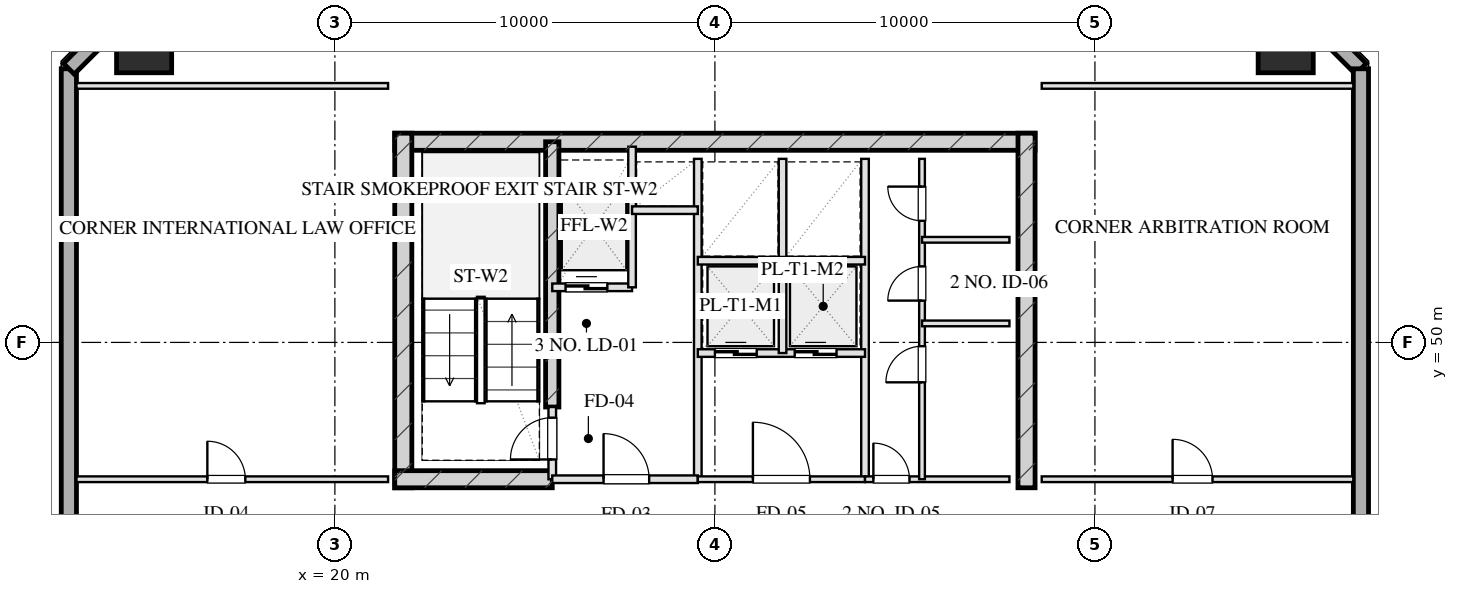
"""IFC4 building model, lengths in metres.
Left out: names, types, materials, properties, quantities, classifications, styles, units other than length and angle.
Written with IfcOpenShell. Run it as: python <this file> out.ifc"""

import sys

from ifc_helpers import new_model, si_unit, direction, frame, frame_2d, origin, origin_2d, place, context, subcontext, project, spatial, rectangle, hollow_rectangle, extrude, element, fill, save


model = new_model("IFC4")
c1 = context("Model", 3, precision=1e-05, world=origin(), true_north=direction((0.0, 1.0)))
c2 = subcontext(c1, "Body", "Model", "MODEL_VIEW")
j1 = project(units=[si_unit("LENGTHUNIT", "METRE"), si_unit("PLANEANGLEUNIT", "RADIAN")], contexts=[c1])
p1 = place(None, origin())
s1 = spatial("IfcSite", under=j1, at=p1, CompositionType="ELEMENT")
p2 = place(p1, origin())
s2 = spatial("IfcBuilding", under=s1, at=p2, CompositionType="ELEMENT")
p3 = place(p2, frame((0.0, 0.0, 188.6)))
s3 = spatial("IfcBuildingStorey", under=s2, at=p3, CompositionType="ELEMENT", Elevation=188.6)
p4 = place(p3, frame((21.575, 55.28, 0.0), z_axis=(0.0, 0.0, 1.0), x_axis=(1.0, 0.0, 0.0)))
e1 = element("IfcWall", 1, at=p4, inside=s3, PredefinedType="SHEAR", context=c2, shape_type="SweptSolid", body=[
    extrude(rectangle(XDim=16.85, YDim=0.45, at=frame_2d((8.425, 0.0))), origin(), (0.0, 0.0, 1.0), 3.45),
])
for number, where, z_axis, x_axis in (
    (2, (21.8, 46.175, 0.0), (0.0, 0.0, 1.0), (0.0, 1.0, 0.0)),
    (3, (38.2, 46.175, 0.0), (0.0, 0.0, 1.0), (0.0, 1.0, 0.0)),
):
    element("IfcWall", number, at=place(p3, frame(where, z_axis=z_axis, x_axis=x_axis)), inside=s3, PredefinedType="SHEAR", context=c2, shape_type="SweptSolid", body=[
        extrude(rectangle(XDim=9.33, YDim=0.45, at=frame_2d((4.665, 0.0))), origin(), (0.0, 0.0, 1.0), 3.45),
    ])
p5 = place(p3, frame((25.72, 48.3, 0.0), z_axis=(0.0, 0.0, 1.0), x_axis=(0.0, 1.0, 0.0)))
e4 = element("IfcWall", 4, at=p5, inside=s3, PredefinedType="SHEAR", context=c2, shape_type="SweptSolid", body=[
    extrude(rectangle(XDim=6.98, YDim=0.35, at=frame_2d((3.49, 0.0))), origin(), (0.0, 0.0, 1.0), 3.45),
])
p6 = place(p3, frame((21.575, 46.4, 0.0), z_axis=(0.0, 0.0, 1.0), x_axis=(1.0, 0.0, 0.0)))
e5 = element("IfcWall", 5, at=p6, inside=s3, PredefinedType="SHEAR", context=c2, shape_type="SweptSolid", body=[
    extrude(rectangle(XDim=4.145, YDim=0.45, at=frame_2d((2.073, 0.0))), origin(), (0.0, 0.0, 1.0), 3.45),
])
for number, where, z_axis, x_axis in (
    (6, (45.02, 57.82, 0.0), (0.0, 0.0, 1.0), (1.0, 0.0, 0.0)),
    (7, (14.98, 57.82, 0.0), (0.0, 0.0, 1.0), (1.0, 0.0, 0.0)),
):
    element("IfcColumn", number, at=place(p3, frame(where, z_axis=z_axis, x_axis=x_axis)), inside=s3, PredefinedType="COLUMN", context=c2, shape_type="SweptSolid", body=[
        extrude(hollow_rectangle(XDim=1.45, YDim=1.45, WallThickness=0.05, at=origin_2d()), origin(), (0.0, 0.0, 1.0), 3.451),
    ])
p7 = place(p3, frame((13.0, 10.8, 0.0), z_axis=(0.0, 0.0, 1.0), x_axis=(0.0, 1.0, 0.0)))
e8 = element("IfcWall", 8, at=p7, inside=s3, PredefinedType="SOLIDWALL", context=c2, shape_type="SweptSolid", body=[
    extrude(rectangle(XDim=46.4, YDim=0.4, at=frame_2d((23.2, 0.0))), origin(), (0.0, 0.0, 1.0), 2.61),
])
p8 = place(p7, frame((24.75, 0.0, 0.75)))
e9 = element("IfcOpeningElement", 9, at=p8, cuts=e8, PredefinedType="OPENING", context=c2, shape_type="SweptSolid", body=[
    extrude(rectangle(XDim=2.1, YDim=1.46, at=frame_2d((1.05, 0.73))), frame((0.0, 0.21, 0.0), z_axis=(0.0, -1.0, 0.0), x_axis=(1.0, 0.0, 0.0)), (0.0, 0.0, 1.0), 0.42),
])
p9 = place(p7, frame((28.55, 0.0, 0.75)))
e10 = element("IfcOpeningElement", 10, at=p9, cuts=e8, PredefinedType="OPENING", context=c2, shape_type="SweptSolid", body=[
    extrude(rectangle(XDim=2.1, YDim=1.46, at=frame_2d((1.05, 0.73))), frame((0.0, 0.21, 0.0), z_axis=(0.0, -1.0, 0.0), x_axis=(1.0, 0.0, 0.0)), (0.0, 0.0, 1.0), 0.42),
])
p10 = place(p7, frame((19.55, 0.0, 0.0)))
e11 = element("IfcOpeningElement", 11, at=p10, cuts=e8, PredefinedType="OPENING", context=c2, shape_type="SweptSolid", body=[
    extrude(rectangle(XDim=1.1, YDim=2.15, at=frame_2d((0.55, 1.075))), frame((0.0, 0.21, 0.0), z_axis=(0.0, -1.0, 0.0), x_axis=(1.0, 0.0, 0.0)), (0.0, 0.0, 1.0), 0.42),
])
for number, where, z_axis, x_axis in (
    (12, (13.0, 57.2, 0.0), (0.0, 0.0, 1.0), (0.707, 0.707, 0.0)),
    (13, (44.4, 59.8, 0.0), (0.0, 0.0, 1.0), (0.707, -0.707, 0.0)),
):
    element("IfcWall", number, at=place(p3, frame(where, z_axis=z_axis, x_axis=x_axis)), inside=s3, PredefinedType="SOLIDWALL", context=c2, shape_type="SweptSolid", body=[
        extrude(rectangle(XDim=3.677, YDim=0.4, at=frame_2d((1.838, 0.0))), origin(), (0.0, 0.0, 1.0), 2.61),
    ])
p11 = place(p3, frame((47.0, 57.2, 0.0), z_axis=(0.0, 0.0, 1.0), x_axis=(0.0, -1.0, 0.0)))
e14 = element("IfcWall", 14, at=p11, inside=s3, PredefinedType="SOLIDWALL", context=c2, shape_type="SweptSolid", body=[
    extrude(rectangle(XDim=46.4, YDim=0.4, at=frame_2d((23.2, 0.0))), origin(), (0.0, 0.0, 1.0), 2.61),
])
p12 = place(p11, frame((19.55, 0.0, 0.75)))
e15 = element("IfcOpeningElement", 15, at=p12, cuts=e14, PredefinedType="OPENING", context=c2, shape_type="SweptSolid", body=[
    extrude(rectangle(XDim=2.1, YDim=1.46, at=frame_2d((1.05, 0.73))), frame((0.0, 0.21, 0.0), z_axis=(0.0, -1.0, 0.0), x_axis=(1.0, 0.0, 0.0)), (0.0, 0.0, 1.0), 0.42),
])
p13 = place(p11, frame((15.75, 0.0, 0.75)))
e16 = element("IfcOpeningElement", 16, at=p13, cuts=e14, PredefinedType="OPENING", context=c2, shape_type="SweptSolid", body=[
    extrude(rectangle(XDim=2.1, YDim=1.46, at=frame_2d((1.05, 0.73))), frame((0.0, 0.21, 0.0), z_axis=(0.0, -1.0, 0.0), x_axis=(1.0, 0.0, 0.0)), (0.0, 0.0, 1.0), 0.42),
])
p14 = place(p11, frame((27.05, 0.0, 0.0)))
e17 = element("IfcOpeningElement", 17, at=p14, cuts=e14, PredefinedType="OPENING", context=c2, shape_type="SweptSolid", body=[
    extrude(rectangle(XDim=1.1, YDim=2.15, at=frame_2d((0.55, 1.075))), frame((0.0, 0.21, 0.0), z_axis=(0.0, -1.0, 0.0), x_axis=(1.0, 0.0, 0.0)), (0.0, 0.0, 1.0), 0.42),
])
p15 = place(p3, frame((25.72, 46.4, 0.0), z_axis=(0.0, 0.0, 1.0), x_axis=(0.0, 1.0, 0.0)))
e18 = element("IfcWall", 18, at=p15, inside=s3, PredefinedType="PARTITIONING", context=c2, shape_type="SweptSolid", body=[
    extrude(rectangle(XDim=1.9, YDim=0.2, at=frame_2d((0.95, 0.0))), origin(), (0.0, 0.0, 1.0), 3.175),
])
p16 = place(p15, frame((0.52, 0.0, 0.0)))
e19 = element("IfcOpeningElement", 19, at=p16, cuts=e18, PredefinedType="OPENING", context=c2, shape_type="SweptSolid", body=[
    extrude(rectangle(XDim=1.1, YDim=2.05, at=frame_2d((0.55, 1.025))), frame((0.0, 0.11, 0.0), z_axis=(0.0, -1.0, 0.0), x_axis=(1.0, 0.0, 0.0)), (0.0, 0.0, 1.0), 0.22),
])
p17 = place(p3, frame((29.55, 46.4, 0.0), z_axis=(0.0, 0.0, 1.0), x_axis=(0.0, 1.0, 0.0)))
e20 = element("IfcWall", 20, at=p17, inside=s3, PredefinedType="PARTITIONING", context=c2, shape_type="SweptSolid", body=[
    extrude(rectangle(XDim=8.43, YDim=0.2, at=frame_2d((4.215, 0.0))), origin(), (0.0, 0.0, 1.0), 3.175),
])
p18 = place(p3, frame((25.72, 46.4, 0.0), z_axis=(0.0, 0.0, 1.0), x_axis=(1.0, 0.0, 0.0)))
e21 = element("IfcWall", 21, at=p18, inside=s3, PredefinedType="PARTITIONING", context=c2, shape_type="SweptSolid", body=[
    extrude(rectangle(XDim=3.83, YDim=0.2, at=frame_2d((1.915, 0.0))), origin(), (0.0, 0.0, 1.0), 3.175),
])
p19 = place(p18, frame((1.35, 0.0, 0.0)))
e22 = element("IfcOpeningElement", 22, at=p19, cuts=e21, PredefinedType="OPENING", context=c2, shape_type="SweptSolid", body=[
    extrude(rectangle(XDim=1.2, YDim=2.05, at=frame_2d((0.6, 1.025))), frame((0.0, 0.11, 0.0), z_axis=(0.0, -1.0, 0.0), x_axis=(1.0, 0.0, 0.0)), (0.0, 0.0, 1.0), 0.22),
])
p20 = place(p3, frame((25.72, 51.45, 0.0), z_axis=(0.0, 0.0, 1.0), x_axis=(1.0, 0.0, 0.0)))
e23 = element("IfcWall", 23, at=p20, inside=s3, PredefinedType="PARTITIONING", context=c2, shape_type="SweptSolid", body=[
    extrude(rectangle(XDim=2.1, YDim=0.2, at=frame_2d((1.05, 0.0))), origin(), (0.0, 0.0, 1.0), 3.175),
])
p21 = place(p20, frame((0.35, 0.0, 0.0)))
e24 = element("IfcOpeningElement", 24, at=p21, cuts=e23, PredefinedType="OPENING", context=c2, shape_type="SweptSolid", body=[
    extrude(rectangle(XDim=1.1, YDim=2.05, at=frame_2d((0.55, 1.025))), frame((0.0, 0.11, 0.0), z_axis=(0.0, -1.0, 0.0), x_axis=(1.0, 0.0, 0.0)), (0.0, 0.0, 1.0), 0.22),
])
p22 = place(p3, frame((27.82, 51.45, 0.0), z_axis=(0.0, 0.0, 1.0), x_axis=(0.0, 1.0, 0.0)))
e25 = element("IfcWall", 25, at=p22, inside=s3, PredefinedType="PARTITIONING", context=c2, shape_type="SweptSolid", body=[
    extrude(rectangle(XDim=3.7, YDim=0.2, at=frame_2d((1.85, 0.0))), origin(), (0.0, 0.0, 1.0), 3.175),
])
p23 = place(p3, frame((27.82, 53.48, 0.0), z_axis=(0.0, 0.0, 1.0), x_axis=(1.0, 0.0, 0.0)))
e26 = element("IfcWall", 26, at=p23, inside=s3, PredefinedType="PARTITIONING", context=c2, shape_type="SweptSolid", body=[
    extrude(rectangle(XDim=1.73, YDim=0.2, at=frame_2d((0.865, 0.0))), origin(), (0.0, 0.0, 1.0), 3.175),
])
p24 = place(p3, frame((33.95, 46.4, 0.0), z_axis=(0.0, 0.0, 1.0), x_axis=(0.0, 1.0, 0.0)))
e27 = element("IfcWall", 27, at=p24, inside=s3, PredefinedType="PARTITIONING", context=c2, shape_type="SweptSolid", body=[
    extrude(rectangle(XDim=8.43, YDim=0.2, at=frame_2d((4.215, 0.0))), origin(), (0.0, 0.0, 1.0), 3.175),
])
p25 = place(p3, frame((29.55, 46.4, 0.0), z_axis=(0.0, 0.0, 1.0), x_axis=(1.0, 0.0, 0.0)))
e28 = element("IfcWall", 28, at=p25, inside=s3, PredefinedType="PARTITIONING", context=c2, shape_type="SweptSolid", body=[
    extrude(rectangle(XDim=4.4, YDim=0.15, at=frame_2d((2.2, 0.0))), origin(), (0.0, 0.0, 1.0), 3.175),
])
p26 = place(p25, frame((1.45, 0.0, 0.0)))
e29 = element("IfcOpeningElement", 29, at=p26, cuts=e28, PredefinedType="OPENING", context=c2, shape_type="SweptSolid", body=[
    extrude(rectangle(XDim=1.5, YDim=2.05, at=frame_2d((0.75, 1.025))), frame((0.0, 0.085, 0.0), z_axis=(0.0, -1.0, 0.0), x_axis=(1.0, 0.0, 0.0)), (0.0, 0.0, 1.0), 0.17),
])
p27 = place(p3, frame((29.55, 49.72, 0.0), z_axis=(0.0, 0.0, 1.0), x_axis=(1.0, 0.0, 0.0)))
e30 = element("IfcWall", 30, at=p27, inside=s3, PredefinedType="PARTITIONING", context=c2, shape_type="SweptSolid", body=[
    extrude(rectangle(XDim=4.4, YDim=0.2, at=frame_2d((2.2, 0.0))), origin(), (0.0, 0.0, 1.0), 3.175),
])
p28 = place(p27, frame((0.45, 0.0, 0.0)))
e31 = element("IfcOpeningElement", 31, at=p28, cuts=e30, PredefinedType="OPENING", context=c2, shape_type="SweptSolid", body=[
    extrude(rectangle(XDim=1.1, YDim=2.05, at=frame_2d((0.55, 1.025))), frame((0.0, 0.11, 0.0), z_axis=(0.0, -1.0, 0.0), x_axis=(1.0, 0.0, 0.0)), (0.0, 0.0, 1.0), 0.22),
])
p29 = place(p27, frame((2.55, 0.0, 0.0)))
e32 = element("IfcOpeningElement", 32, at=p29, cuts=e30, PredefinedType="OPENING", context=c2, shape_type="SweptSolid", body=[
    extrude(rectangle(XDim=1.1, YDim=2.05, at=frame_2d((0.55, 1.025))), frame((0.0, 0.11, 0.0), z_axis=(0.0, -1.0, 0.0), x_axis=(1.0, 0.0, 0.0)), (0.0, 0.0, 1.0), 0.22),
])
p30 = place(p3, frame((31.78, 49.72, 0.0), z_axis=(0.0, 0.0, 1.0), x_axis=(0.0, 1.0, 0.0)))
e33 = element("IfcWall", 33, at=p30, inside=s3, PredefinedType="PARTITIONING", context=c2, shape_type="SweptSolid", body=[
    extrude(rectangle(XDim=5.11, YDim=0.2, at=frame_2d((2.555, 0.0))), origin(), (0.0, 0.0, 1.0), 3.175),
])
p31 = place(p3, frame((29.55, 52.15, 0.0), z_axis=(0.0, 0.0, 1.0), x_axis=(1.0, 0.0, 0.0)))
e34 = element("IfcWall", 34, at=p31, inside=s3, PredefinedType="PARTITIONING", context=c2, shape_type="SweptSolid", body=[
    extrude(rectangle(XDim=4.4, YDim=0.2, at=frame_2d((2.2, 0.0))), origin(), (0.0, 0.0, 1.0), 3.175),
])
p32 = place(p3, frame((33.95, 46.4, 0.0), z_axis=(0.0, 0.0, 1.0), x_axis=(1.0, 0.0, 0.0)))
e35 = element("IfcWall", 35, at=p32, inside=s3, PredefinedType="PARTITIONING", context=c2, shape_type="SweptSolid", body=[
    extrude(rectangle(XDim=3.8, YDim=0.15, at=frame_2d((1.9, 0.0))), origin(), (0.0, 0.0, 1.0), 3.175),
])
p33 = place(p32, frame((0.22, 0.0, 0.0)))
e36 = element("IfcOpeningElement", 36, at=p33, cuts=e35, PredefinedType="OPENING", context=c2, shape_type="SweptSolid", body=[
    extrude(rectangle(XDim=0.95, YDim=2.05, at=frame_2d((0.475, 1.025))), frame((0.0, 0.085, 0.0), z_axis=(0.0, -1.0, 0.0), x_axis=(1.0, 0.0, 0.0)), (0.0, 0.0, 1.0), 0.17),
])
p34 = place(p3, frame((35.45, 46.4, 0.0), z_axis=(0.0, 0.0, 1.0), x_axis=(0.0, 1.0, 0.0)))
e37 = element("IfcWall", 37, at=p34, inside=s3, PredefinedType="PARTITIONING", context=c2, shape_type="SweptSolid", body=[
    extrude(rectangle(XDim=8.43, YDim=0.15, at=frame_2d((4.215, 0.0))), origin(), (0.0, 0.0, 1.0), 2.765),
])
p35 = place(p34, frame((2.55, 0.0, 0.0)))
e38 = element("IfcOpeningElement", 38, at=p35, cuts=e37, PredefinedType="OPENING", context=c2, shape_type="SweptSolid", body=[
    extrude(rectangle(XDim=0.95, YDim=2.05, at=frame_2d((0.475, 1.025))), frame((0.0, 0.085, 0.0), z_axis=(0.0, -1.0, 0.0), x_axis=(1.0, 0.0, 0.0)), (0.0, 0.0, 1.0), 0.17),
])
p36 = place(p34, frame((4.7, 0.0, 0.0)))
e39 = element("IfcOpeningElement", 39, at=p36, cuts=e37, PredefinedType="OPENING", context=c2, shape_type="SweptSolid", body=[
    extrude(rectangle(XDim=0.9, YDim=2.05, at=frame_2d((0.45, 1.025))), frame((0.0, 0.085, 0.0), z_axis=(0.0, -1.0, 0.0), x_axis=(1.0, 0.0, 0.0)), (0.0, 0.0, 1.0), 0.17),
])
p37 = place(p34, frame((6.8, 0.0, 0.0)))
e40 = element("IfcOpeningElement", 40, at=p37, cuts=e37, PredefinedType="OPENING", context=c2, shape_type="SweptSolid", body=[
    extrude(rectangle(XDim=0.9, YDim=2.05, at=frame_2d((0.45, 1.025))), frame((0.0, 0.085, 0.0), z_axis=(0.0, -1.0, 0.0), x_axis=(1.0, 0.0, 0.0)), (0.0, 0.0, 1.0), 0.17),
])
for number, where, z_axis, x_axis in (
    (41, (35.45, 50.5, 0.0), (0.0, 0.0, 1.0), (1.0, 0.0, 0.0)),
    (42, (35.45, 52.7, 0.0), (0.0, 0.0, 1.0), (1.0, 0.0, 0.0)),
):
    element("IfcWall", number, at=place(p3, frame(where, z_axis=z_axis, x_axis=x_axis)), inside=s3, PredefinedType="PARTITIONING", context=c2, shape_type="SweptSolid", body=[
        extrude(rectangle(XDim=2.3, YDim=0.15, at=frame_2d((1.15, 0.0))), origin(), (0.0, 0.0, 1.0), 3.175),
    ])
p38 = place(p3, frame((13.2, 56.75, 0.0), z_axis=(0.0, 0.0, 1.0), x_axis=(1.0, 0.0, 0.0)))
e43 = element("IfcWall", 43, at=p38, inside=s3, PredefinedType="PARTITIONING", context=c2, shape_type="SweptSolid", body=[
    extrude(rectangle(XDim=8.2, YDim=0.15, at=frame_2d((4.1, 0.0))), origin(), (0.0, 0.0, 1.0), 3.175),
])
p39 = place(p3, frame((13.2, 46.4, 0.0), z_axis=(0.0, 0.0, 1.0), x_axis=(1.0, 0.0, 0.0)))
e44 = element("IfcWall", 44, at=p39, inside=s3, PredefinedType="PARTITIONING", context=c2, shape_type="SweptSolid", body=[
    extrude(rectangle(XDim=8.2, YDim=0.15, at=frame_2d((4.1, 0.0))), origin(), (0.0, 0.0, 1.0), 3.175),
])
p40 = place(p39, frame((3.444, 0.0, 0.0)))
e45 = element("IfcOpeningElement", 45, at=p40, cuts=e44, PredefinedType="OPENING", context=c2, shape_type="SweptSolid", body=[
    extrude(rectangle(XDim=1.0, YDim=2.05, at=frame_2d((0.5, 1.025))), frame((0.0, 0.085, 0.0), z_axis=(0.0, -1.0, 0.0), x_axis=(1.0, 0.0, 0.0)), (0.0, 0.0, 1.0), 0.17),
])
p41 = place(p3, frame((38.6, 56.75, 0.0), z_axis=(0.0, 0.0, 1.0), x_axis=(1.0, 0.0, 0.0)))
e46 = element("IfcWall", 46, at=p41, inside=s3, PredefinedType="PARTITIONING", context=c2, shape_type="SweptSolid", body=[
    extrude(rectangle(XDim=8.2, YDim=0.15, at=frame_2d((4.1, 0.0))), origin(), (0.0, 0.0, 1.0), 3.175),
])
p42 = place(p3, frame((38.6, 46.4, 0.0), z_axis=(0.0, 0.0, 1.0), x_axis=(1.0, 0.0, 0.0)))
e47 = element("IfcWall", 47, at=p42, inside=s3, PredefinedType="PARTITIONING", context=c2, shape_type="SweptSolid", body=[
    extrude(rectangle(XDim=8.2, YDim=0.15, at=frame_2d((4.1, 0.0))), origin(), (0.0, 0.0, 1.0), 3.175),
])
p43 = place(p42, frame((3.444, 0.0, 0.0)))
e48 = element("IfcOpeningElement", 48, at=p43, cuts=e47, PredefinedType="OPENING", context=c2, shape_type="SweptSolid", body=[
    extrude(rectangle(XDim=1.05, YDim=2.05, at=frame_2d((0.525, 1.025))), frame((0.0, 0.085, 0.0), z_axis=(0.0, -1.0, 0.0), x_axis=(1.0, 0.0, 0.0)), (0.0, 0.0, 1.0), 0.17),
])
p44 = place(p16, origin())
e49 = element("IfcDoor", 49, at=p44, inside=s3, OperationType="SINGLE_SWING_LEFT", PredefinedType="DOOR", context=c2, shape_type="SweptSolid", body=[
    extrude(rectangle(XDim=1.1, YDim=2.05, at=frame_2d((0.55, 1.025))), frame((0.0, 0.025, 0.0), z_axis=(0.0, -1.0, 0.0), x_axis=(1.0, 0.0, 0.0)), (0.0, 0.0, 1.0), 0.05),
])
fill(e19, e49)
p45 = place(p19, origin())
e50 = element("IfcDoor", 50, at=p45, inside=s3, OperationType="SINGLE_SWING_LEFT", PredefinedType="DOOR", context=c2, shape_type="SweptSolid", body=[
    extrude(rectangle(XDim=1.2, YDim=2.05, at=frame_2d((0.6, 1.025))), frame((0.0, 0.025, 0.0), z_axis=(0.0, -1.0, 0.0), x_axis=(1.0, 0.0, 0.0)), (0.0, 0.0, 1.0), 0.05),
])
fill(e22, e50)
p46 = place(p21, origin())
e51 = element("IfcDoor", 51, at=p46, inside=s3, OperationType="DOUBLE_DOOR_SLIDING", PredefinedType="DOOR", context=c2, shape_type="SweptSolid", body=[
    extrude(rectangle(XDim=1.1, YDim=2.05, at=frame_2d((0.55, 1.025))), frame((0.0, 0.025, 0.0), z_axis=(0.0, -1.0, 0.0), x_axis=(1.0, 0.0, 0.0)), (0.0, 0.0, 1.0), 0.05),
])
fill(e24, e51)
p47 = place(p26, origin())
e52 = element("IfcDoor", 52, at=p47, inside=s3, OperationType="SINGLE_SWING_LEFT", PredefinedType="DOOR", context=c2, shape_type="SweptSolid", body=[
    extrude(rectangle(XDim=1.5, YDim=2.05, at=frame_2d((0.75, 1.025))), frame((0.0, 0.025, 0.0), z_axis=(0.0, -1.0, 0.0), x_axis=(1.0, 0.0, 0.0)), (0.0, 0.0, 1.0), 0.05),
])
fill(e29, e52)
p48 = place(p28, origin())
e53 = element("IfcDoor", 53, at=p48, inside=s3, OperationType="DOUBLE_DOOR_SLIDING", PredefinedType="DOOR", context=c2, shape_type="SweptSolid", body=[
    extrude(rectangle(XDim=1.1, YDim=2.05, at=frame_2d((0.55, 1.025))), frame((0.0, 0.025, 0.0), z_axis=(0.0, -1.0, 0.0), x_axis=(1.0, 0.0, 0.0)), (0.0, 0.0, 1.0), 0.05),
])
fill(e31, e53)
p49 = place(p29, origin())
e54 = element("IfcDoor", 54, at=p49, inside=s3, OperationType="DOUBLE_DOOR_SLIDING", PredefinedType="DOOR", context=c2, shape_type="SweptSolid", body=[
    extrude(rectangle(XDim=1.1, YDim=2.05, at=frame_2d((0.55, 1.025))), frame((0.0, 0.025, 0.0), z_axis=(0.0, -1.0, 0.0), x_axis=(1.0, 0.0, 0.0)), (0.0, 0.0, 1.0), 0.05),
])
fill(e32, e54)
p50 = place(p33, origin())
e55 = element("IfcDoor", 55, at=p50, inside=s3, OperationType="SINGLE_SWING_LEFT", PredefinedType="DOOR", context=c2, shape_type="SweptSolid", body=[
    extrude(rectangle(XDim=0.95, YDim=2.05, at=frame_2d((0.475, 1.025))), frame((0.0, 0.025, 0.0), z_axis=(0.0, -1.0, 0.0), x_axis=(1.0, 0.0, 0.0)), (0.0, 0.0, 1.0), 0.05),
])
fill(e36, e55)
p51 = place(p35, origin())
e56 = element("IfcDoor", 56, at=p51, inside=s3, OperationType="SINGLE_SWING_LEFT", PredefinedType="DOOR", context=c2, shape_type="SweptSolid", body=[
    extrude(rectangle(XDim=0.95, YDim=2.05, at=frame_2d((0.475, 1.025))), frame((0.0, 0.025, 0.0), z_axis=(0.0, -1.0, 0.0), x_axis=(1.0, 0.0, 0.0)), (0.0, 0.0, 1.0), 0.05),
])
fill(e38, e56)
p52 = place(p36, origin())
e57 = element("IfcDoor", 57, at=p52, inside=s3, OperationType="SINGLE_SWING_LEFT", PredefinedType="DOOR", context=c2, shape_type="SweptSolid", body=[
    extrude(rectangle(XDim=0.9, YDim=2.05, at=frame_2d((0.45, 1.025))), frame((0.0, 0.025, 0.0), z_axis=(0.0, -1.0, 0.0), x_axis=(1.0, 0.0, 0.0)), (0.0, 0.0, 1.0), 0.05),
])
fill(e39, e57)
p53 = place(p37, origin())
e58 = element("IfcDoor", 58, at=p53, inside=s3, OperationType="SINGLE_SWING_RIGHT", PredefinedType="DOOR", context=c2, shape_type="SweptSolid", body=[
    extrude(rectangle(XDim=0.9, YDim=2.05, at=frame_2d((0.45, 1.025))), frame((0.0, 0.025, 0.0), z_axis=(0.0, -1.0, 0.0), x_axis=(1.0, 0.0, 0.0)), (0.0, 0.0, 1.0), 0.05),
])
fill(e40, e58)
p54 = place(p40, origin())
e59 = element("IfcDoor", 59, at=p54, inside=s3, OperationType="SINGLE_SWING_LEFT", PredefinedType="DOOR", context=c2, shape_type="SweptSolid", body=[
    extrude(rectangle(XDim=1.0, YDim=2.05, at=frame_2d((0.5, 1.025))), frame((0.0, 0.025, 0.0), z_axis=(0.0, -1.0, 0.0), x_axis=(1.0, 0.0, 0.0)), (0.0, 0.0, 1.0), 0.05),
])
fill(e45, e59)
p55 = place(p43, origin())
e60 = element("IfcDoor", 60, at=p55, inside=s3, OperationType="SINGLE_SWING_LEFT", PredefinedType="DOOR", context=c2, shape_type="SweptSolid", body=[
    extrude(rectangle(XDim=1.05, YDim=2.05, at=frame_2d((0.525, 1.025))), frame((0.0, 0.025, 0.0), z_axis=(0.0, -1.0, 0.0), x_axis=(1.0, 0.0, 0.0)), (0.0, 0.0, 1.0), 0.05),
])
fill(e48, e60)
save(model, sys.argv[1])
